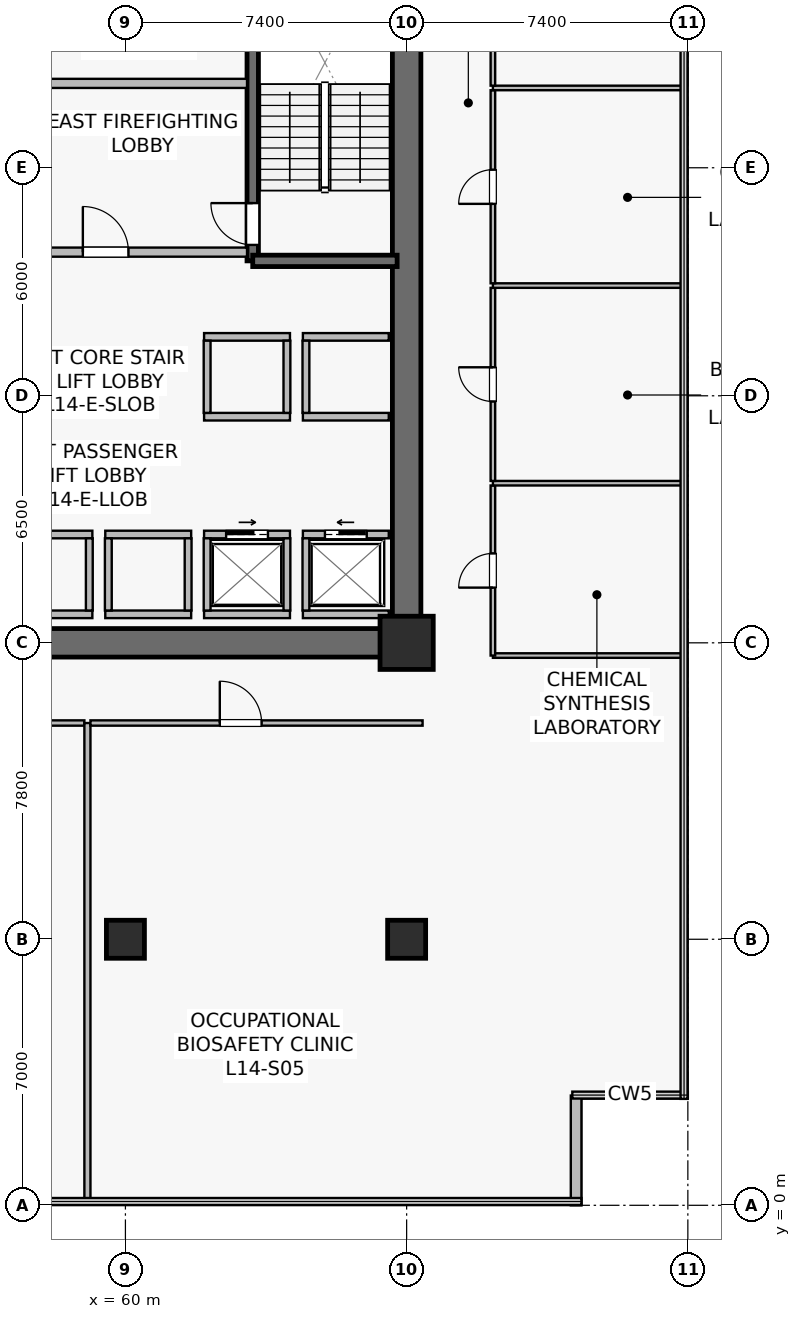
"""IFC4 building model, lengths in metres.
Left out: names, types, materials, properties, quantities, classifications, styles, units other than length and angle.
Written with IfcOpenShell. Run it as: python <this file> out.ifc"""

import sys

from ifc_helpers import new_model, si_unit, direction, frame, frame_2d, origin, origin_2d, place, context, subcontext, project, spatial, rectangle, extrude, source, transform, mapped, element, fill, save


model = new_model("IFC4")
c1 = context("Model", 3, precision=1e-05, world=origin(), true_north=direction((0.0, 1.0)))
c2 = subcontext(c1, "Body", "Model", "MODEL_VIEW")
j1 = project(units=[si_unit("LENGTHUNIT", "METRE"), si_unit("PLANEANGLEUNIT", "RADIAN")], contexts=[c1])
p1 = place(None, origin())
s1 = spatial("IfcSite", under=j1, at=p1, CompositionType="ELEMENT")
p2 = place(p1, origin())
s2 = spatial("IfcBuilding", under=s1, at=p2, CompositionType="ELEMENT")
p3 = place(p2, frame((0.0, 0.0, 58.0)))
s3 = spatial("IfcBuildingStorey", under=s2, at=p3, CompositionType="ELEMENT", Elevation=58.0)
p4 = place(p3, frame((52.225, 14.8, 0.0), z_axis=(0.0, 0.0, 1.0), x_axis=(1.0, 0.0, 0.0)))
e1 = element("IfcWall", 1, at=p4, inside=s3, PredefinedType="SHEAR", context=c2, shape_type="SweptSolid", body=[
    extrude(rectangle(XDim=15.55, YDim=0.75, at=frame_2d((7.775, 0.0))), origin(), (0.0, 0.0, 1.0), 3.78),
])
p5 = place(p3, frame((67.4, 15.175, 0.0), z_axis=(0.0, 0.0, 1.0), x_axis=(0.0, 1.0, 0.0)))
e2 = element("IfcWall", 2, at=p5, inside=s3, PredefinedType="SHEAR", context=c2, shape_type="SweptSolid", body=[
    extrude(rectangle(XDim=18.25, YDim=0.75, at=frame_2d((9.125, 0.0))), origin(), (0.0, 0.0, 1.0), 3.78),
])
p6 = place(p3, frame((63.35, 24.85, 0.0), z_axis=(0.0, 0.0, 1.0), x_axis=(0.0, 1.0, 0.0)))
e3 = element("IfcWall", 3, at=p6, inside=s3, PredefinedType="SHEAR", context=c2, shape_type="SweptSolid", body=[
    extrude(rectangle(XDim=8.63, YDim=0.3, at=frame_2d((4.315, 0.0))), origin(), (0.0, 0.0, 1.0), 3.78),
])
p7 = place(p6, frame((0.42, 0.0, 0.0)))
e4 = element("IfcOpeningElement", 4, at=p7, cuts=e3, PredefinedType="OPENING", context=c2, shape_type="SweptSolid", body=[
    extrude(rectangle(XDim=1.1, YDim=2.15, at=frame_2d((0.55, 1.075))), frame((0.0, 0.16, 0.0), z_axis=(0.0, -1.0, 0.0), x_axis=(1.0, 0.0, 0.0)), (0.0, 0.0, 1.0), 0.32),
])
p8 = place(p3, frame((63.35, 24.85, 0.0), z_axis=(0.0, 0.0, 1.0), x_axis=(1.0, 0.0, 0.0)))
e5 = element("IfcWall", 5, at=p8, inside=s3, PredefinedType="SHEAR", context=c2, shape_type="SweptSolid", body=[
    extrude(rectangle(XDim=3.8, YDim=0.3, at=frame_2d((1.9, 0.0))), origin(), (0.0, 0.0, 1.0), 3.78),
])
m1 = source(origin(), c2, "Body", "SweptSolid", [
    extrude(rectangle(XDim=1.0, YDim=1.0, at=origin_2d()), origin(), (0.0, 0.0, 1.0), 4.1),
])
p9 = place(p3, frame((60.0, 7.0, 0.0), z_axis=(0.0, 0.0, 1.0), x_axis=(1.0, 0.0, 0.0)))
e6 = element("IfcColumn", 6, at=p9, inside=s3, PredefinedType="COLUMN", context=c2, shape_type="MappedRepresentation", body=[
    mapped(m1, transform((0.0, 0.0, 0.0), scale=1.0)),
])
m2 = source(origin(), c2, "Body", "SweptSolid", [
    extrude(rectangle(XDim=1.4, YDim=1.4, at=origin_2d()), origin(), (0.0, 0.0, 1.0), 4.1),
])
p10 = place(p3, frame((67.4, 14.8, 0.0), z_axis=(0.0, 0.0, 1.0), x_axis=(1.0, 0.0, 0.0)))
e7 = element("IfcColumn", 7, at=p10, inside=s3, PredefinedType="COLUMN", context=c2, shape_type="MappedRepresentation", body=[
    mapped(m2, transform((0.0, 0.0, 0.0), scale=1.0)),
])
p11 = place(p3, frame((67.4, 7.0, 0.0), z_axis=(0.0, 0.0, 1.0), x_axis=(1.0, 0.0, 0.0)))
e8 = element("IfcColumn", 8, at=p11, inside=s3, PredefinedType="COLUMN", context=c2, shape_type="MappedRepresentation", body=[
    mapped(m1, transform((0.0, 0.0, 0.0), scale=1.0)),
])
p12 = place(p3, frame((71.86, 0.0, 0.0), z_axis=(0.0, 0.0, 1.0), x_axis=(0.0, 1.0, 0.0)))
e9 = element("IfcWall", 9, at=p12, inside=s3, PredefinedType="STANDARD", context=c2, shape_type="SweptSolid", body=[
    extrude(rectangle(XDim=2.888, YDim=0.28, at=frame_2d((1.444, 0.0))), origin(), (0.0, 0.0, 1.0), 3.78),
])
p13 = place(p3, frame((56.28, 25.08, 0.0), z_axis=(0.0, 0.0, 1.0), x_axis=(1.0, 0.0, 0.0)))
e10 = element("IfcWall", 10, at=p13, inside=s3, PredefinedType="SOLIDWALL", context=c2, shape_type="SweptSolid", body=[
    extrude(rectangle(XDim=6.92, YDim=0.24, at=frame_2d((3.46, 0.0))), origin(), (0.0, 0.0, 1.0), 3.065),
])
p14 = place(p13, frame((2.6, 0.0, 0.0)))
e11 = element("IfcOpeningElement", 11, at=p14, cuts=e10, PredefinedType="OPENING", context=c2, shape_type="SweptSolid", body=[
    extrude(rectangle(XDim=1.2, YDim=2.16, at=frame_2d((0.6, 1.08))), frame((0.0, 0.13, 0.0), z_axis=(0.0, -1.0, 0.0), x_axis=(1.0, 0.0, 0.0)), (0.0, 0.0, 1.0), 0.26),
])
p15 = place(p3, frame((56.28, 29.52, 0.0), z_axis=(0.0, 0.0, 1.0), x_axis=(1.0, 0.0, 0.0)))
e12 = element("IfcWall", 12, at=p15, inside=s3, PredefinedType="SOLIDWALL", context=c2, shape_type="SweptSolid", body=[
    extrude(rectangle(XDim=6.92, YDim=0.24, at=frame_2d((3.46, 0.0))), origin(), (0.0, 0.0, 1.0), 3.065),
])
p16 = place(p3, frame((64.67, 17.65, 0.0), z_axis=(0.0, 0.0, 1.0), x_axis=(1.0, 0.0, 0.0)))
e13 = element("IfcWall", 13, at=p16, inside=s3, PredefinedType="SOLIDWALL", context=c2, shape_type="SweptSolid", body=[
    extrude(rectangle(XDim=2.26, YDim=0.2, at=frame_2d((1.13, 0.0))), origin(), (0.0, 0.0, 1.0), 3.78),
])
p17 = place(p16, frame((0.58, 0.0, 0.0)))
e14 = element("IfcOpeningElement", 14, at=p17, cuts=e13, PredefinedType="OPENING", context=c2, shape_type="SweptSolid", body=[
    extrude(rectangle(XDim=1.1, YDim=2.22, at=frame_2d((0.55, 1.11))), frame((0.0, 0.11, 0.0), z_axis=(0.0, -1.0, 0.0), x_axis=(1.0, 0.0, 0.0)), (0.0, 0.0, 1.0), 0.22),
])
p18 = place(p3, frame((64.67, 15.55, 0.0), z_axis=(0.0, 0.0, 1.0), x_axis=(1.0, 0.0, 0.0)))
e15 = element("IfcWall", 15, at=p18, inside=s3, PredefinedType="SOLIDWALL", context=c2, shape_type="SweptSolid", body=[
    extrude(rectangle(XDim=2.26, YDim=0.2, at=frame_2d((1.13, 0.0))), origin(), (0.0, 0.0, 1.0), 3.78),
])
p19 = place(p3, frame((64.75, 15.65, 0.0), z_axis=(0.0, 0.0, 1.0), x_axis=(0.0, 1.0, 0.0)))
e16 = element("IfcWall", 16, at=p19, inside=s3, PredefinedType="SOLIDWALL", context=c2, shape_type="SweptSolid", body=[
    extrude(rectangle(XDim=1.9, YDim=0.18, at=frame_2d((0.95, 0.0))), origin(), (0.0, 0.0, 1.0), 3.78),
])
p20 = place(p3, frame((62.07, 17.65, 0.0), z_axis=(0.0, 0.0, 1.0), x_axis=(1.0, 0.0, 0.0)))
e17 = element("IfcWall", 17, at=p20, inside=s3, PredefinedType="SOLIDWALL", context=c2, shape_type="SweptSolid", body=[
    extrude(rectangle(XDim=2.26, YDim=0.2, at=frame_2d((1.13, 0.0))), origin(), (0.0, 0.0, 1.0), 3.78),
])
p21 = place(p20, frame((0.58, 0.0, 0.0)))
e18 = element("IfcOpeningElement", 18, at=p21, cuts=e17, PredefinedType="OPENING", context=c2, shape_type="SweptSolid", body=[
    extrude(rectangle(XDim=1.1, YDim=2.22, at=frame_2d((0.55, 1.11))), frame((0.0, 0.11, 0.0), z_axis=(0.0, -1.0, 0.0), x_axis=(1.0, 0.0, 0.0)), (0.0, 0.0, 1.0), 0.22),
])
p22 = place(p3, frame((62.07, 15.55, 0.0), z_axis=(0.0, 0.0, 1.0), x_axis=(1.0, 0.0, 0.0)))
e19 = element("IfcWall", 19, at=p22, inside=s3, PredefinedType="SOLIDWALL", context=c2, shape_type="SweptSolid", body=[
    extrude(rectangle(XDim=2.26, YDim=0.2, at=frame_2d((1.13, 0.0))), origin(), (0.0, 0.0, 1.0), 3.78),
])
for number, where, z_axis, x_axis in (
    (20, (62.15, 15.65, 0.0), (0.0, 0.0, 1.0), (0.0, 1.0, 0.0)),
    (21, (64.25, 15.65, 0.0), (0.0, 0.0, 1.0), (0.0, 1.0, 0.0)),
):
    element("IfcWall", number, at=place(p3, frame(where, z_axis=z_axis, x_axis=x_axis)), inside=s3, PredefinedType="SOLIDWALL", context=c2, shape_type="SweptSolid", body=[
        extrude(rectangle(XDim=1.9, YDim=0.18, at=frame_2d((0.95, 0.0))), origin(), (0.0, 0.0, 1.0), 3.78),
    ])
for number, where, z_axis, x_axis in (
    (22, (59.47, 17.65, 0.0), (0.0, 0.0, 1.0), (1.0, 0.0, 0.0)),
    (23, (59.47, 15.55, 0.0), (0.0, 0.0, 1.0), (1.0, 0.0, 0.0)),
):
    element("IfcWall", number, at=place(p3, frame(where, z_axis=z_axis, x_axis=x_axis)), inside=s3, PredefinedType="SOLIDWALL", context=c2, shape_type="SweptSolid", body=[
        extrude(rectangle(XDim=2.26, YDim=0.2, at=frame_2d((1.13, 0.0))), origin(), (0.0, 0.0, 1.0), 3.065),
    ])
for number, where, z_axis, x_axis in (
    (24, (59.55, 15.65, 0.0), (0.0, 0.0, 1.0), (0.0, 1.0, 0.0)),
    (25, (61.65, 15.65, 0.0), (0.0, 0.0, 1.0), (0.0, 1.0, 0.0)),
):
    element("IfcWall", number, at=place(p3, frame(where, z_axis=z_axis, x_axis=x_axis)), inside=s3, PredefinedType="SOLIDWALL", context=c2, shape_type="SweptSolid", body=[
        extrude(rectangle(XDim=1.9, YDim=0.18, at=frame_2d((0.95, 0.0))), origin(), (0.0, 0.0, 1.0), 3.78),
    ])
for number, where, z_axis, x_axis in (
    (26, (56.87, 17.65, 0.0), (0.0, 0.0, 1.0), (1.0, 0.0, 0.0)),
    (27, (56.87, 15.55, 0.0), (0.0, 0.0, 1.0), (1.0, 0.0, 0.0)),
):
    element("IfcWall", number, at=place(p3, frame(where, z_axis=z_axis, x_axis=x_axis)), inside=s3, PredefinedType="SOLIDWALL", context=c2, shape_type="SweptSolid", body=[
        extrude(rectangle(XDim=2.26, YDim=0.2, at=frame_2d((1.13, 0.0))), origin(), (0.0, 0.0, 1.0), 3.78),
    ])
p23 = place(p3, frame((59.05, 15.65, 0.0), z_axis=(0.0, 0.0, 1.0), x_axis=(0.0, 1.0, 0.0)))
e28 = element("IfcWall", 28, at=p23, inside=s3, PredefinedType="SOLIDWALL", context=c2, shape_type="SweptSolid", body=[
    extrude(rectangle(XDim=1.9, YDim=0.18, at=frame_2d((0.95, 0.0))), origin(), (0.0, 0.0, 1.0), 3.78),
])
for number, where, z_axis, x_axis in (
    (29, (64.67, 20.75, 0.0), (0.0, 0.0, 1.0), (1.0, 0.0, 0.0)),
    (30, (64.67, 22.85, 0.0), (0.0, 0.0, 1.0), (1.0, 0.0, 0.0)),
):
    element("IfcWall", number, at=place(p3, frame(where, z_axis=z_axis, x_axis=x_axis)), inside=s3, PredefinedType="SOLIDWALL", context=c2, shape_type="SweptSolid", body=[
        extrude(rectangle(XDim=2.26, YDim=0.2, at=frame_2d((1.13, 0.0))), origin(), (0.0, 0.0, 1.0), 3.78),
    ])
p24 = place(p3, frame((64.75, 20.85, 0.0), z_axis=(0.0, 0.0, 1.0), x_axis=(0.0, 1.0, 0.0)))
e31 = element("IfcWall", 31, at=p24, inside=s3, PredefinedType="SOLIDWALL", context=c2, shape_type="SweptSolid", body=[
    extrude(rectangle(XDim=1.9, YDim=0.18, at=frame_2d((0.95, 0.0))), origin(), (0.0, 0.0, 1.0), 3.78),
])
for number, where, z_axis, x_axis in (
    (32, (62.07, 20.75, 0.0), (0.0, 0.0, 1.0), (1.0, 0.0, 0.0)),
    (33, (62.07, 22.85, 0.0), (0.0, 0.0, 1.0), (1.0, 0.0, 0.0)),
):
    element("IfcWall", number, at=place(p3, frame(where, z_axis=z_axis, x_axis=x_axis)), inside=s3, PredefinedType="SOLIDWALL", context=c2, shape_type="SweptSolid", body=[
        extrude(rectangle(XDim=2.26, YDim=0.2, at=frame_2d((1.13, 0.0))), origin(), (0.0, 0.0, 1.0), 3.78),
    ])
for number, where, z_axis, x_axis in (
    (34, (62.15, 20.85, 0.0), (0.0, 0.0, 1.0), (0.0, 1.0, 0.0)),
    (35, (64.25, 20.85, 0.0), (0.0, 0.0, 1.0), (0.0, 1.0, 0.0)),
):
    element("IfcWall", number, at=place(p3, frame(where, z_axis=z_axis, x_axis=x_axis)), inside=s3, PredefinedType="SOLIDWALL", context=c2, shape_type="SweptSolid", body=[
        extrude(rectangle(XDim=1.9, YDim=0.18, at=frame_2d((0.95, 0.0))), origin(), (0.0, 0.0, 1.0), 3.78),
    ])
p25 = place(p3, frame((44.28, 12.69, 0.0), z_axis=(0.0, 0.0, 1.0), x_axis=(1.0, 0.0, 0.0)))
e36 = element("IfcWall", 36, at=p25, inside=s3, PredefinedType="PARTITIONING", context=c2, shape_type="SweptSolid", body=[
    extrude(rectangle(XDim=14.64, YDim=0.14, at=frame_2d((7.32, 0.0))), origin(), (0.0, 0.0, 1.0), 3.065),
])
p26 = place(p25, frame((4.844, 0.0, 0.0)))
e37 = element("IfcOpeningElement", 37, at=p26, cuts=e36, PredefinedType="OPENING", context=c2, shape_type="SweptSolid", body=[
    extrude(rectangle(XDim=1.1, YDim=2.18, at=frame_2d((0.55, 1.09))), frame((0.0, 0.08, 0.0), z_axis=(0.0, -1.0, 0.0), x_axis=(1.0, 0.0, 0.0)), (0.0, 0.0, 1.0), 0.16),
])
p27 = place(p3, frame((59.0, 0.11, 0.0), z_axis=(0.0, 0.0, 1.0), x_axis=(0.0, 1.0, 0.0)))
e38 = element("IfcWall", 38, at=p27, inside=s3, PredefinedType="PARTITIONING", context=c2, shape_type="SweptSolid", body=[
    extrude(rectangle(XDim=12.58, YDim=0.16, at=frame_2d((6.29, 0.0))), origin(), (0.0, 0.0, 1.0), 3.015),
])
p28 = place(p3, frame((59.08, 12.69, 0.0), z_axis=(0.0, 0.0, 1.0), x_axis=(1.0, 0.0, 0.0)))
e39 = element("IfcWall", 39, at=p28, inside=s3, PredefinedType="PARTITIONING", context=c2, shape_type="SweptSolid", body=[
    extrude(rectangle(XDim=8.74, YDim=0.14, at=frame_2d((4.37, 0.0))), origin(), (0.0, 0.0, 1.0), 3.065),
])
p29 = place(p28, frame((3.404, 0.0, 0.0)))
e40 = element("IfcOpeningElement", 40, at=p29, cuts=e39, PredefinedType="OPENING", context=c2, shape_type="SweptSolid", body=[
    extrude(rectangle(XDim=1.1, YDim=2.18, at=frame_2d((0.55, 1.09))), frame((0.0, 0.08, 0.0), z_axis=(0.0, -1.0, 0.0), x_axis=(1.0, 0.0, 0.0)), (0.0, 0.0, 1.0), 0.16),
])
p30 = place(p3, frame((69.67, 14.465, 0.0), z_axis=(0.0, 0.0, 1.0), x_axis=(1.0, 0.0, 0.0)))
e41 = element("IfcWall", 41, at=p30, inside=s3, PredefinedType="PARTITIONING", context=c2, shape_type="SweptSolid", body=[
    extrude(rectangle(XDim=5.02, YDim=0.12, at=frame_2d((2.51, 0.0))), origin(), (0.0, 0.0, 1.0), 3.78),
])
p31 = place(p3, frame((69.67, 14.465, 0.0), z_axis=(0.0, 0.0, 1.0), x_axis=(0.0, 1.0, 0.0)))
e42 = element("IfcWall", 42, at=p31, inside=s3, PredefinedType="PARTITIONING", context=c2, shape_type="SweptSolid", body=[
    extrude(rectangle(XDim=4.475, YDim=0.12, at=frame_2d((2.237, 0.0))), origin(), (0.0, 0.0, 1.0), 3.78),
])
p32 = place(p31, frame((1.788, 0.0, 0.0)))
e43 = element("IfcOpeningElement", 43, at=p32, cuts=e42, PredefinedType="OPENING", context=c2, shape_type="SweptSolid", body=[
    extrude(rectangle(XDim=0.9, YDim=2.1, at=frame_2d((0.45, 1.05))), frame((0.0, 0.07, 0.0), z_axis=(0.0, -1.0, 0.0), x_axis=(1.0, 0.0, 0.0)), (0.0, 0.0, 1.0), 0.14),
])
p33 = place(p3, frame((69.67, 19.0, 0.0), z_axis=(0.0, 0.0, 1.0), x_axis=(1.0, 0.0, 0.0)))
e44 = element("IfcWall", 44, at=p33, inside=s3, PredefinedType="PARTITIONING", context=c2, shape_type="SweptSolid", body=[
    extrude(rectangle(XDim=5.02, YDim=0.12, at=frame_2d((2.51, 0.0))), origin(), (0.0, 0.0, 1.0), 3.78),
])
p34 = place(p3, frame((69.67, 19.06, 0.0), z_axis=(0.0, 0.0, 1.0), x_axis=(0.0, 1.0, 0.0)))
e45 = element("IfcWall", 45, at=p34, inside=s3, PredefinedType="PARTITIONING", context=c2, shape_type="SweptSolid", body=[
    extrude(rectangle(XDim=5.08, YDim=0.12, at=frame_2d((2.54, 0.0))), origin(), (0.0, 0.0, 1.0), 3.78),
])
p35 = place(p34, frame((2.09, 0.0, 0.0)))
e46 = element("IfcOpeningElement", 46, at=p35, cuts=e45, PredefinedType="OPENING", context=c2, shape_type="SweptSolid", body=[
    extrude(rectangle(XDim=0.9, YDim=2.1, at=frame_2d((0.45, 1.05))), frame((0.0, 0.07, 0.0), z_axis=(0.0, -1.0, 0.0), x_axis=(1.0, 0.0, 0.0)), (0.0, 0.0, 1.0), 0.14),
])
p36 = place(p3, frame((69.67, 24.2, 0.0), z_axis=(0.0, 0.0, 1.0), x_axis=(1.0, 0.0, 0.0)))
e47 = element("IfcWall", 47, at=p36, inside=s3, PredefinedType="PARTITIONING", context=c2, shape_type="SweptSolid", body=[
    extrude(rectangle(XDim=5.02, YDim=0.12, at=frame_2d((2.51, 0.0))), origin(), (0.0, 0.0, 1.0), 3.78),
])
p37 = place(p3, frame((69.67, 24.26, 0.0), z_axis=(0.0, 0.0, 1.0), x_axis=(0.0, 1.0, 0.0)))
e48 = element("IfcWall", 48, at=p37, inside=s3, PredefinedType="PARTITIONING", context=c2, shape_type="SweptSolid", body=[
    extrude(rectangle(XDim=5.08, YDim=0.12, at=frame_2d((2.54, 0.0))), origin(), (0.0, 0.0, 1.0), 3.78),
])
p38 = place(p37, frame((2.09, 0.0, 0.0)))
e49 = element("IfcOpeningElement", 49, at=p38, cuts=e48, PredefinedType="OPENING", context=c2, shape_type="SweptSolid", body=[
    extrude(rectangle(XDim=0.9, YDim=2.1, at=frame_2d((0.45, 1.05))), frame((0.0, 0.07, 0.0), z_axis=(0.0, -1.0, 0.0), x_axis=(1.0, 0.0, 0.0)), (0.0, 0.0, 1.0), 0.14),
])
p39 = place(p3, frame((69.67, 29.4, 0.0), z_axis=(0.0, 0.0, 1.0), x_axis=(1.0, 0.0, 0.0)))
e50 = element("IfcWall", 50, at=p39, inside=s3, PredefinedType="PARTITIONING", context=c2, shape_type="SweptSolid", body=[
    extrude(rectangle(XDim=5.02, YDim=0.12, at=frame_2d((2.51, 0.0))), origin(), (0.0, 0.0, 1.0), 3.78),
])
p40 = place(p3, frame((69.67, 29.46, 0.0), z_axis=(0.0, 0.0, 1.0), x_axis=(0.0, 1.0, 0.0)))
e51 = element("IfcWall", 51, at=p40, inside=s3, PredefinedType="PARTITIONING", context=c2, shape_type="SweptSolid", body=[
    extrude(rectangle(XDim=4.675, YDim=0.12, at=frame_2d((2.337, 0.0))), origin(), (0.0, 0.0, 1.0), 3.78),
])
p41 = place(p40, frame((1.887, 0.0, 0.0)))
e52 = element("IfcOpeningElement", 52, at=p41, cuts=e51, PredefinedType="OPENING", context=c2, shape_type="SweptSolid", body=[
    extrude(rectangle(XDim=0.9, YDim=2.1, at=frame_2d((0.45, 1.05))), frame((0.0, 0.07, 0.0), z_axis=(0.0, -1.0, 0.0), x_axis=(1.0, 0.0, 0.0)), (0.0, 0.0, 1.0), 0.14),
])
m3 = source(origin(), c2, "Body", "SweptSolid", [
    extrude(rectangle(XDim=1.1, YDim=2.15, at=frame_2d((0.55, 1.075))), frame((0.0, 0.025, 0.0), z_axis=(0.0, -1.0, 0.0), x_axis=(1.0, 0.0, 0.0)), (0.0, 0.0, 1.0), 0.05),
])
p42 = place(p7, origin())
e53 = element("IfcDoor", 53, at=p42, inside=s3, OperationType="SINGLE_SWING_RIGHT", PredefinedType="DOOR", context=c2, shape_type="MappedRepresentation", body=[
    mapped(m3, transform((0.0, 0.0, 0.0), scale=1.0)),
])
fill(e4, e53)
m4 = source(origin(), c2, "Body", "SweptSolid", [
    extrude(rectangle(XDim=1.2, YDim=2.16, at=frame_2d((0.6, 1.08))), frame((0.0, 0.025, 0.0), z_axis=(0.0, -1.0, 0.0), x_axis=(1.0, 0.0, 0.0)), (0.0, 0.0, 1.0), 0.05),
])
p43 = place(p14, origin())
e54 = element("IfcDoor", 54, at=p43, inside=s3, OperationType="SINGLE_SWING_LEFT", PredefinedType="DOOR", context=c2, shape_type="MappedRepresentation", body=[
    mapped(m4, transform((0.0, 0.0, 0.0), scale=1.0)),
])
fill(e11, e54)
m5 = source(origin(), c2, "Body", "SweptSolid", [
    extrude(rectangle(XDim=1.1, YDim=2.22, at=frame_2d((0.55, 1.11))), frame((0.0, 0.025, 0.0), z_axis=(0.0, -1.0, 0.0), x_axis=(1.0, 0.0, 0.0)), (0.0, 0.0, 1.0), 0.05),
])
p44 = place(p17, origin())
e55 = element("IfcDoor", 55, at=p44, inside=s3, OperationType="SLIDING_TO_LEFT", PredefinedType="USERDEFINED", context=c2, shape_type="MappedRepresentation", body=[
    mapped(m5, transform((0.0, 0.0, 0.0), scale=1.0)),
])
fill(e14, e55)
p45 = place(p21, origin())
e56 = element("IfcDoor", 56, at=p45, inside=s3, OperationType="SLIDING_TO_RIGHT", PredefinedType="USERDEFINED", context=c2, shape_type="MappedRepresentation", body=[
    mapped(m5, transform((0.0, 0.0, 0.0), scale=1.0)),
])
fill(e18, e56)
m6 = source(origin(), c2, "Body", "SweptSolid", [
    extrude(rectangle(XDim=1.1, YDim=2.18, at=frame_2d((0.55, 1.09))), frame((0.0, 0.025, 0.0), z_axis=(0.0, -1.0, 0.0), x_axis=(1.0, 0.0, 0.0)), (0.0, 0.0, 1.0), 0.05),
])
p46 = place(p29, origin())
e57 = element("IfcDoor", 57, at=p46, inside=s3, OperationType="SINGLE_SWING_LEFT", PredefinedType="DOOR", context=c2, shape_type="MappedRepresentation", body=[
    mapped(m6, transform((0.0, 0.0, 0.0), scale=1.0)),
])
fill(e40, e57)
m7 = source(origin(), c2, "Body", "SweptSolid", [
    extrude(rectangle(XDim=0.9, YDim=2.1, at=frame_2d((0.45, 1.05))), frame((0.0, 0.025, 0.0), z_axis=(0.0, -1.0, 0.0), x_axis=(1.0, 0.0, 0.0)), (0.0, 0.0, 1.0), 0.05),
])
p47 = place(p32, origin())
e58 = element("IfcDoor", 58, at=p47, inside=s3, OperationType="SINGLE_SWING_LEFT", PredefinedType="DOOR", context=c2, shape_type="MappedRepresentation", body=[
    mapped(m7, transform((0.0, 0.0, 0.0), scale=1.0)),
])
fill(e43, e58)
p48 = place(p35, origin())
e59 = element("IfcDoor", 59, at=p48, inside=s3, OperationType="SINGLE_SWING_RIGHT", PredefinedType="DOOR", context=c2, shape_type="MappedRepresentation", body=[
    mapped(m7, transform((0.0, 0.0, 0.0), scale=1.0)),
])
fill(e46, e59)
p49 = place(p38, origin())
e60 = element("IfcDoor", 60, at=p49, inside=s3, OperationType="SINGLE_SWING_LEFT", PredefinedType="DOOR", context=c2, shape_type="MappedRepresentation", body=[
    mapped(m7, transform((0.0, 0.0, 0.0), scale=1.0)),
])
fill(e49, e60)
save(model, sys.argv[1])
